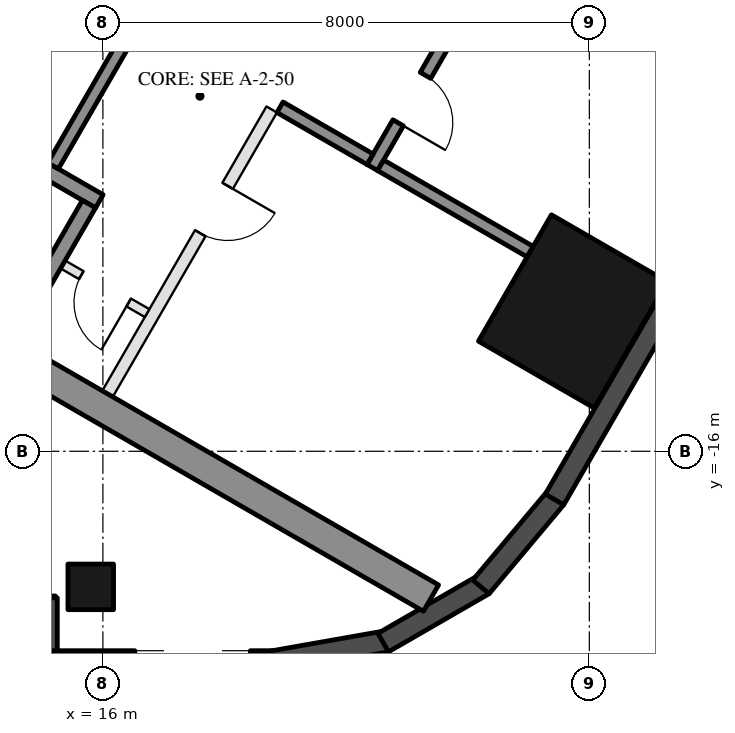
"""IFC4 building model, lengths in metres.
Left out: names, types, materials, properties, quantities, classifications, styles, units other than length and angle.
Written with IfcOpenShell. Run it as: python <this file> out.ifc"""

import sys

from ifc_helpers import new_model, si_unit, direction, frame, frame_2d, origin, origin_2d, place, context, subcontext, project, spatial, rectangle, hollow_rectangle, extrude, element, fill, save


model = new_model("IFC4")
c1 = context("Model", 3, precision=1e-05, world=origin(), true_north=direction((0.0, 1.0)))
c2 = subcontext(c1, "Body", "Model", "MODEL_VIEW")
j1 = project(units=[si_unit("LENGTHUNIT", "METRE"), si_unit("PLANEANGLEUNIT", "RADIAN")], contexts=[c1])
p1 = place(None, origin())
s1 = spatial("IfcSite", under=j1, at=p1, CompositionType="ELEMENT")
p2 = place(p1, origin())
s2 = spatial("IfcBuilding", under=s1, at=p2, CompositionType="ELEMENT")
p3 = place(p2, frame((0.0, 0.0, 216.9)))
s3 = spatial("IfcBuildingStorey", under=s2, at=p3, CompositionType="ELEMENT", Elevation=216.9)
p4 = place(p3, frame((15.8, -18.23, 0.0), z_axis=(0.0, 0.0, 1.0), x_axis=(-1.0, 0.0, 0.0)))
e1 = element("IfcColumn", 1, at=p4, inside=s3, PredefinedType="COLUMN", context=c2, shape_type="SweptSolid", body=[
    extrude(hollow_rectangle(XDim=0.75, YDim=0.75, WallThickness=0.035, at=origin_2d()), origin(), (0.0, 0.0, 1.0), 3.7),
])
p5 = place(p3, frame((23.729, -13.7, 0.0), z_axis=(0.0, 0.0, 1.0), x_axis=(0.5, 0.866025403784, 0.0)))
e2 = element("IfcColumn", 2, at=p5, inside=s3, PredefinedType="COLUMN", context=c2, shape_type="SweptSolid", body=[
    extrude(hollow_rectangle(XDim=2.4, YDim=2.2, WallThickness=0.06, at=origin_2d()), origin(), (0.0, 0.0, 1.0), 3.7),
])
p6 = place(p3, frame((8.48, -18.555, 0.0), z_axis=(0.0, 0.0, 1.0), x_axis=(1.0, 0.0, 0.0)))
e3 = element("IfcWall", 3, at=p6, inside=s3, PredefinedType="SOLIDWALL", context=c2, shape_type="SweptSolid", body=[
    extrude(rectangle(XDim=6.74, YDim=0.35, at=frame_2d((3.37, 0.0))), origin(), (0.0, 0.0, 1.0), 3.55),
])
p7 = place(p6, frame((0.32, 0.0, 0.0)))
e4 = element("IfcOpeningElement", 4, at=p7, cuts=e3, PredefinedType="OPENING", context=c2, shape_type="SweptSolid", body=[
    extrude(rectangle(XDim=2.4, YDim=2.4, at=frame_2d((1.2, 1.2))), frame((0.0, 0.185, 0.0), z_axis=(0.0, -1.0, 0.0), x_axis=(1.0, 0.0, 0.0)), (0.0, 0.0, 1.0), 0.37),
])
p8 = place(p6, frame((3.02, 0.0, 0.3)))
e5 = element("IfcOpeningElement", 5, at=p8, cuts=e3, PredefinedType="OPENING", context=c2, shape_type="SweptSolid", body=[
    extrude(rectangle(XDim=2.9, YDim=2.65, at=frame_2d((1.45, 1.325))), frame((0.0, 0.185, 0.0), z_axis=(0.0, -1.0, 0.0), x_axis=(1.0, 0.0, 0.0)), (0.0, 0.0, 1.0), 0.37),
])
p9 = place(p3, frame((15.075, -18.41, 0.0), z_axis=(0.0, 0.0, 1.0), x_axis=(0.0, -1.0, 0.0)))
e6 = element("IfcWall", 6, at=p9, inside=s3, PredefinedType="SOLIDWALL", context=c2, shape_type="SweptSolid", body=[
    extrude(rectangle(XDim=1.22, YDim=0.35, at=frame_2d((0.61, 0.0))), origin(), (0.0, 0.0, 1.0), 3.55),
])
p10 = place(p3, frame((14.9, -19.455, 0.0), z_axis=(0.0, 0.0, 1.0), x_axis=(1.0, 0.0, 0.0)))
e7 = element("IfcWall", 7, at=p10, inside=s3, PredefinedType="SOLIDWALL", context=c2, shape_type="SweptSolid", body=[
    extrude(rectangle(XDim=3.916, YDim=0.35, at=frame_2d((1.958, 0.0))), origin(), (0.0, 0.0, 1.0), 3.55),
])
p11 = place(p10, frame((1.625, 0.0, 0.3)))
e8 = element("IfcOpeningElement", 8, at=p11, cuts=e7, PredefinedType="OPENING", context=c2, shape_type="SweptSolid", body=[
    extrude(rectangle(XDim=1.9, YDim=2.65, at=frame_2d((0.95, 1.325))), frame((0.0, 0.185, 0.0), z_axis=(0.0, -1.0, 0.0), x_axis=(1.0, 0.0, 0.0)), (0.0, 0.0, 1.0), 0.37),
])
p12 = place(p3, frame((18.785, -19.458, 0.0), z_axis=(0.0, 0.0, 1.0), x_axis=(0.984798995425, 0.173697837091, 0.0)))
e9 = element("IfcWall", 9, at=p12, inside=s3, PredefinedType="SOLIDWALL", context=c2, shape_type="SweptSolid", body=[
    extrude(rectangle(XDim=1.91, YDim=0.35, at=frame_2d((0.955, 0.0))), origin(), (0.0, 0.0, 1.0), 3.55),
])
for number, where, z_axis, x_axis in (
    (10, (20.61, -19.147, 0.0), (0.0, 0.0, 1.0), (0.866, 0.5, 0.0)),
    (11, (22.217, -18.231, 0.0), (0.0, 0.0, 1.0), (0.643, 0.766, 0.0)),
):
    element("IfcWall", number, at=place(p3, frame(where, z_axis=z_axis, x_axis=x_axis)), inside=s3, PredefinedType="SOLIDWALL", context=c2, shape_type="SweptSolid", body=[
        extrude(rectangle(XDim=1.91, YDim=0.35, at=frame_2d((0.955, 0.0))), origin(), (0.0, 0.0, 1.0), 3.55),
    ])
p13 = place(p3, frame((23.427, -16.792, 0.0), z_axis=(0.0, 0.0, 1.0), x_axis=(0.500018773155, 0.866014564827, 0.0)))
e12 = element("IfcWall", 12, at=p13, inside=s3, PredefinedType="SOLIDWALL", context=c2, shape_type="SweptSolid", body=[
    extrude(rectangle(XDim=5.658, YDim=0.35, at=frame_2d((2.829, 0.0))), origin(), (0.0, 0.0, 1.0), 3.55),
])
for number, where, z_axis, x_axis in (
    (13, (8.547, -10.997, 0.0), (0.0, 0.0, 1.0), (0.866, -0.5, 0.0)),
    (14, (13.797, -1.903, 0.0), (0.0, 0.0, 1.0), (0.866, -0.5, 0.0)),
):
    element("IfcWall", number, at=place(p3, frame(where, z_axis=z_axis, x_axis=x_axis)), inside=s3, PredefinedType="SHEAR", context=c2, shape_type="SweptSolid", body=[
        extrude(rectangle(XDim=14.837, YDim=0.5, at=frame_2d((7.418, 0.0))), origin(), (0.0, 0.0, 1.0), 3.5),
    ])
p14 = place(p3, frame((10.356, -8.664, 0.0), z_axis=(0.0, 0.0, 1.0), x_axis=(0.866028629588, -0.499994412703, 0.0)))
e15 = element("IfcWall", 15, at=p14, inside=s3, PredefinedType="SHEAR", context=c2, shape_type="SweptSolid", body=[
    extrude(rectangle(XDim=6.45, YDim=0.25, at=frame_2d((3.225, 0.0))), origin(), (0.0, 0.0, 1.0), 3.5),
])
p15 = place(p14, frame((0.3, 0.0, 0.0)))
e16 = element("IfcOpeningElement", 16, at=p15, cuts=e15, PredefinedType="OPENING", context=c2, shape_type="SweptSolid", body=[
    extrude(rectangle(XDim=1.0, YDim=2.1, at=frame_2d((0.5, 1.05))), frame((0.0, 0.135, 0.0), z_axis=(0.0, -1.0, 0.0), x_axis=(1.0, 0.0, 0.0)), (0.0, 0.0, 1.0), 0.27),
])
p16 = place(p3, frame((14.496, -14.143, 0.0), z_axis=(0.0, 0.0, 1.0), x_axis=(0.500062241894, 0.865989465428, 0.0)))
e17 = element("IfcWall", 17, at=p16, inside=s3, PredefinedType="SHEAR", context=c2, shape_type="SweptSolid", body=[
    extrude(rectangle(XDim=2.55, YDim=0.25, at=frame_2d((1.275, 0.0))), origin(), (0.0, 0.0, 1.0), 3.5),
])
p17 = place(p3, frame((15.181, -11.305, 0.0), z_axis=(0.0, 0.0, 1.0), x_axis=(0.49994636267, 0.866056369097, 0.0)))
e18 = element("IfcWall", 18, at=p17, inside=s3, PredefinedType="SHEAR", context=c2, shape_type="SweptSolid", body=[
    extrude(rectangle(XDim=2.8, YDim=0.2, at=frame_2d((1.4, 0.0))), origin(), (0.0, 0.0, 1.0), 3.5),
])
p18 = place(p3, frame((20.43, -11.333, 0.0), z_axis=(0.0, 0.0, 1.0), x_axis=(0.500001309137, 0.866024647952, 0.0)))
e19 = element("IfcWall", 19, at=p18, inside=s3, PredefinedType="SHEAR", context=c2, shape_type="SweptSolid", body=[
    extrude(rectangle(XDim=2.4, YDim=0.2, at=frame_2d((1.2, 0.0))), origin(), (0.0, 0.0, 1.0), 3.5),
])
p19 = place(p18, frame((0.85, 0.0, 0.0)))
e20 = element("IfcOpeningElement", 20, at=p19, cuts=e19, PredefinedType="OPENING", context=c2, shape_type="SweptSolid", body=[
    extrude(rectangle(XDim=0.9, YDim=2.1, at=frame_2d((0.45, 1.05))), frame((0.0, 0.11, 0.0), z_axis=(0.0, -1.0, 0.0), x_axis=(1.0, 0.0, 0.0)), (0.0, 0.0, 1.0), 0.22),
])
p20 = place(p3, frame((18.913, -10.342, 0.0), z_axis=(0.0, 0.0, 1.0), x_axis=(0.866038183914, -0.499977863513, 0.0)))
e21 = element("IfcWall", 21, at=p20, inside=s3, PredefinedType="SHEAR", context=c2, shape_type="SweptSolid", body=[
    extrude(rectangle(XDim=1.71, YDim=0.2, at=frame_2d((0.855, 0.0))), origin(), (0.0, 0.0, 1.0), 3.5),
])
p21 = place(p3, frame((20.567, -11.297, 0.0), z_axis=(0.0, 0.0, 1.0), x_axis=(0.866055327414, -0.49994816717, 0.0)))
e22 = element("IfcWall", 22, at=p21, inside=s3, PredefinedType="SHEAR", context=c2, shape_type="SweptSolid", body=[
    extrude(rectangle(XDim=2.84, YDim=0.2, at=frame_2d((1.42, 0.0))), origin(), (0.0, 0.0, 1.0), 3.5),
])
p22 = place(p3, frame((16.076, -15.055, 0.0), z_axis=(0.0, 0.0, 1.0), x_axis=(0.499995103361, 0.866028230842, 0.0)))
e23 = element("IfcWall", 23, at=p22, inside=s3, PredefinedType="PARTITIONING", context=c2, shape_type="SweptSolid", body=[
    extrude(rectangle(XDim=5.4, YDim=0.2, at=frame_2d((2.7, 0.0))), origin(), (0.0, 0.0, 1.0), 3.5),
])
p23 = place(p22, frame((3.05, 0.0, 0.0)))
e24 = element("IfcOpeningElement", 24, at=p23, cuts=e23, PredefinedType="OPENING", context=c2, shape_type="SweptSolid", body=[
    extrude(rectangle(XDim=0.9, YDim=2.1, at=frame_2d((0.45, 1.05))), frame((0.0, 0.11, 0.0), z_axis=(0.0, -1.0, 0.0), x_axis=(1.0, 0.0, 0.0)), (0.0, 0.0, 1.0), 0.22),
])
p24 = place(p3, frame((15.342, -12.928, 0.0), z_axis=(0.0, 0.0, 1.0), x_axis=(0.865989903783, -0.500061482766, 0.0)))
e25 = element("IfcWall", 25, at=p24, inside=s3, PredefinedType="PARTITIONING", context=c2, shape_type="SweptSolid", body=[
    extrude(rectangle(XDim=1.6, YDim=0.15, at=frame_2d((0.8, 0.0))), origin(), (0.0, 0.0, 1.0), 3.5),
])
p25 = place(p24, frame((0.35, 0.0, 0.0)))
e26 = element("IfcOpeningElement", 26, at=p25, cuts=e25, PredefinedType="OPENING", context=c2, shape_type="SweptSolid", body=[
    extrude(rectangle(XDim=0.9, YDim=2.1, at=frame_2d((0.45, 1.05))), frame((0.0, 0.085, 0.0), z_axis=(0.0, -1.0, 0.0), x_axis=(1.0, 0.0, 0.0)), (0.0, 0.0, 1.0), 0.17),
])
p26 = place(p25, frame((0.9, 0.0, 0.0), z_axis=(0.0, 0.0, 1.0), x_axis=(-1.0, 0.0, 0.0)))
e27 = element("IfcDoor", 27, at=p26, inside=s3, OperationType="SINGLE_SWING_LEFT", PredefinedType="DOOR", context=c2, shape_type="SweptSolid", body=[
    extrude(rectangle(XDim=0.9, YDim=2.1, at=frame_2d((0.45, 1.05))), frame((0.0, 0.025, 0.0), z_axis=(0.0, -1.0, 0.0), x_axis=(1.0, 0.0, 0.0)), (0.0, 0.0, 1.0), 0.05),
])
fill(e26, e27)
p27 = place(p19, frame((0.9, 0.0, 0.0), z_axis=(0.0, 0.0, 1.0), x_axis=(-1.0, 0.0, 0.0)))
e28 = element("IfcDoor", 28, at=p27, inside=s3, OperationType="SINGLE_SWING_RIGHT", PredefinedType="DOOR", context=c2, shape_type="SweptSolid", body=[
    extrude(rectangle(XDim=0.9, YDim=2.1, at=frame_2d((0.45, 1.05))), frame((0.0, 0.025, 0.0), z_axis=(0.0, -1.0, 0.0), x_axis=(1.0, 0.0, 0.0)), (0.0, 0.0, 1.0), 0.05),
])
fill(e20, e28)
p28 = place(p23, frame((0.9, 0.0, 0.0), z_axis=(0.0, 0.0, 1.0), x_axis=(-1.0, 0.0, 0.0)))
e29 = element("IfcDoor", 29, at=p28, inside=s3, OperationType="SINGLE_SWING_LEFT", PredefinedType="DOOR", context=c2, shape_type="SweptSolid", body=[
    extrude(rectangle(XDim=0.9, YDim=2.1, at=frame_2d((0.45, 1.05))), frame((0.0, 0.025, 0.0), z_axis=(0.0, -1.0, 0.0), x_axis=(1.0, 0.0, 0.0)), (0.0, 0.0, 1.0), 0.05),
])
fill(e24, e29)
save(model, sys.argv[1])
